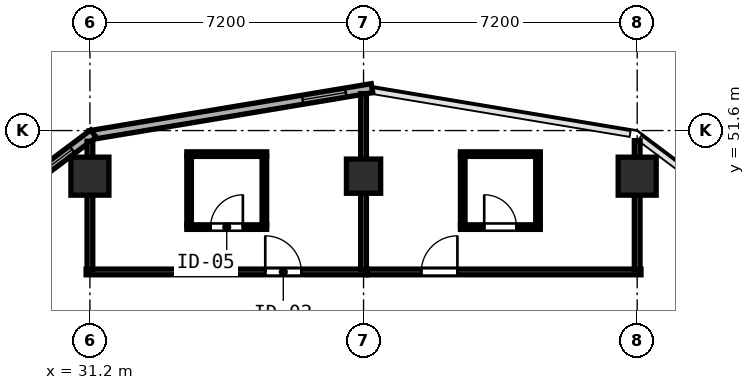
"""IFC4 building model, lengths in metres.
Left out: names, types, materials, properties, quantities, classifications, styles, units other than length and angle.
Written with IfcOpenShell. Run it as: python <this file> out.ifc"""

import sys

from ifc_helpers import new_model, si_unit, direction, frame, frame_2d, origin, origin_2d, place, context, subcontext, project, spatial, rectangle, hollow_rectangle, extrude, element, fill, save


model = new_model("IFC4")
c1 = context("Model", 3, precision=1e-05, world=origin(), true_north=direction((0.0, 1.0)))
c2 = subcontext(c1, "Body", "Model", "MODEL_VIEW")
j1 = project(units=[si_unit("LENGTHUNIT", "METRE"), si_unit("PLANEANGLEUNIT", "RADIAN")], contexts=[c1])
p1 = place(None, origin())
s1 = spatial("IfcSite", under=j1, at=p1, CompositionType="ELEMENT")
p2 = place(p1, origin())
s2 = spatial("IfcBuilding", under=s1, at=p2, CompositionType="ELEMENT")
p3 = place(p2, frame((0.0, 0.0, 98.4)))
s3 = spatial("IfcBuildingStorey", under=s2, at=p3, CompositionType="ELEMENT", Elevation=98.4)
for number, where, z_axis, x_axis in (
    (1, (31.2, 50.4, 0.0), (0.0, 0.0, 1.0), (1.0, 0.0, 0.0)),
    (2, (45.6, 50.4, 0.0), (0.0, 0.0, 1.0), (1.0, 0.0, 0.0)),
):
    element("IfcColumn", number, at=place(p3, frame(where, z_axis=z_axis, x_axis=x_axis)), inside=s3, PredefinedType="COLUMN", context=c2, shape_type="SweptSolid", body=[
        extrude(hollow_rectangle(XDim=1.0, YDim=1.0, WallThickness=0.038, at=origin_2d()), origin(), (0.0, 0.0, 1.0), 3.8),
    ])
p4 = place(p3, frame((38.4, 50.4, 0.0), z_axis=(0.0, 0.0, 1.0), x_axis=(1.0, 0.0, 0.0)))
e3 = element("IfcColumn", 3, at=p4, inside=s3, PredefinedType="COLUMN", context=c2, shape_type="SweptSolid", body=[
    extrude(hollow_rectangle(XDim=0.9, YDim=0.9, WallThickness=0.034, at=origin_2d()), origin(), (0.0, 0.0, 1.0), 3.8),
])
p5 = place(p3, frame((38.622, 52.715, 0.0), z_axis=(0.0, 0.0, 1.0), x_axis=(-0.98639129485, -0.164414760418, 0.0)))
e4 = element("IfcWall", 4, at=p5, inside=s3, PredefinedType="SOLIDWALL", context=c2, shape_type="SweptSolid", body=[
    extrude(rectangle(XDim=7.53, YDim=0.24, at=frame_2d((3.765, 0.0))), origin(), (0.0, 0.0, 1.0), 3.6),
])
p6 = place(p5, frame((0.7, 0.0, 0.85)))
e5 = element("IfcOpeningElement", 5, at=p6, cuts=e4, PredefinedType="OPENING", context=c2, shape_type="SweptSolid", body=[
    extrude(rectangle(XDim=1.15, YDim=1.8, at=frame_2d((0.575, 0.9))), frame((0.0, 0.13, 0.0), z_axis=(0.0, -1.0, 0.0), x_axis=(1.0, 0.0, 0.0)), (0.0, 0.0, 1.0), 0.26),
])
p7 = place(p3, frame((31.292, 51.519, 0.0), z_axis=(0.0, 0.0, 1.0), x_axis=(-0.8, -0.6, 0.0)))
e6 = element("IfcWall", 6, at=p7, inside=s3, PredefinedType="SOLIDWALL", context=c2, shape_type="SweptSolid", body=[
    extrude(rectangle(XDim=6.021, YDim=0.24, at=frame_2d((3.01, 0.0))), origin(), (0.0, 0.0, 1.0), 3.6),
])
p8 = place(p7, frame((0.7, 0.0, 0.85)))
e7 = element("IfcOpeningElement", 7, at=p8, cuts=e6, PredefinedType="OPENING", context=c2, shape_type="SweptSolid", body=[
    extrude(rectangle(XDim=1.15, YDim=1.8, at=frame_2d((0.575, 0.9))), frame((0.0, 0.13, 0.0), z_axis=(0.0, -1.0, 0.0), x_axis=(1.0, 0.0, 0.0)), (0.0, 0.0, 1.0), 0.26),
])
p9 = place(p3, frame((31.1, 47.88, 0.0), z_axis=(0.0, 0.0, 1.0), x_axis=(1.0, 0.0, 0.0)))
e8 = element("IfcWall", 8, at=p9, inside=s3, PredefinedType="PARTITIONING", context=c2, shape_type="SweptSolid", body=[
    extrude(rectangle(XDim=7.4, YDim=0.15, at=frame_2d((3.7, 0.0))), origin(), (0.0, 0.0, 1.0), 3.6),
])
p10 = place(p9, frame((4.714, 0.0, 0.0)))
e9 = element("IfcOpeningElement", 9, at=p10, cuts=e8, PredefinedType="OPENING", context=c2, shape_type="SweptSolid", body=[
    extrude(rectangle(XDim=0.95, YDim=2.15, at=frame_2d((0.475, 1.075))), frame((0.0, 0.085, 0.0), z_axis=(0.0, -1.0, 0.0), x_axis=(1.0, 0.0, 0.0)), (0.0, 0.0, 1.0), 0.17),
])
p11 = place(p3, frame((31.2, 47.94, 0.0), z_axis=(0.0, 0.0, 1.0), x_axis=(0.0, 1.0, 0.0)))
e10 = element("IfcWall", 10, at=p11, inside=s3, PredefinedType="PARTITIONING", context=c2, shape_type="SweptSolid", body=[
    extrude(rectangle(XDim=3.379, YDim=0.15, at=frame_2d((1.689, 0.0))), origin(), (0.0, 0.0, 1.0), 3.085),
])
p12 = place(p3, frame((38.4, 47.94, 0.0), z_axis=(0.0, 0.0, 1.0), x_axis=(0.0, 1.0, 0.0)))
e11 = element("IfcWall", 11, at=p12, inside=s3, PredefinedType="PARTITIONING", context=c2, shape_type="SweptSolid", body=[
    extrude(rectangle(XDim=4.632, YDim=0.15, at=frame_2d((2.316, 0.0))), origin(), (0.0, 0.0, 1.0), 3.6),
])
p13 = place(p3, frame((33.75, 50.98, 0.0), z_axis=(0.0, 0.0, 1.0), x_axis=(1.0, 0.0, 0.0)))
e12 = element("IfcWall", 12, at=p13, inside=s3, PredefinedType="PARTITIONING", context=c2, shape_type="SweptSolid", body=[
    extrude(rectangle(XDim=2.1, YDim=0.12, at=frame_2d((1.05, 0.0))), origin(), (0.0, 0.0, 1.0), 3.6),
])
p14 = place(p3, frame((33.75, 49.06, 0.0), z_axis=(0.0, 0.0, 1.0), x_axis=(1.0, 0.0, 0.0)))
e13 = element("IfcWall", 13, at=p14, inside=s3, PredefinedType="PARTITIONING", context=c2, shape_type="SweptSolid", body=[
    extrude(rectangle(XDim=2.1, YDim=0.12, at=frame_2d((1.05, 0.0))), origin(), (0.0, 0.0, 1.0), 3.6),
])
p15 = place(p14, frame((0.625, 0.0, 0.0)))
e14 = element("IfcOpeningElement", 14, at=p15, cuts=e13, PredefinedType="OPENING", context=c2, shape_type="SweptSolid", body=[
    extrude(rectangle(XDim=0.85, YDim=2.1, at=frame_2d((0.425, 1.05))), frame((0.0, 0.07, 0.0), z_axis=(0.0, -1.0, 0.0), x_axis=(1.0, 0.0, 0.0)), (0.0, 0.0, 1.0), 0.14),
])
for number, where, z_axis, x_axis in (
    (15, (33.81, 49.105, 0.0), (0.0, 0.0, 1.0), (0.0, 1.0, 0.0)),
    (16, (35.79, 49.105, 0.0), (0.0, 0.0, 1.0), (0.0, 1.0, 0.0)),
):
    element("IfcWall", number, at=place(p3, frame(where, z_axis=z_axis, x_axis=x_axis)), inside=s3, PredefinedType="PARTITIONING", context=c2, shape_type="SweptSolid", body=[
        extrude(rectangle(XDim=1.83, YDim=0.12, at=frame_2d((0.915, 0.0))), origin(), (0.0, 0.0, 1.0), 3.6),
    ])
p16 = place(p3, frame((38.502, 47.88, 0.0), z_axis=(0.0, 0.0, 1.0), x_axis=(1.0, 0.0, 0.0)))
e17 = element("IfcWall", 17, at=p16, inside=s3, PredefinedType="PARTITIONING", context=c2, shape_type="SweptSolid", body=[
    extrude(rectangle(XDim=7.198, YDim=0.15, at=frame_2d((3.599, 0.0))), origin(), (0.0, 0.0, 1.0), 3.6),
])
p17 = place(p16, frame((1.417, 0.0, 0.0)))
e18 = element("IfcOpeningElement", 18, at=p17, cuts=e17, PredefinedType="OPENING", context=c2, shape_type="SweptSolid", body=[
    extrude(rectangle(XDim=0.95, YDim=2.15, at=frame_2d((0.475, 1.075))), frame((0.0, 0.085, 0.0), z_axis=(0.0, -1.0, 0.0), x_axis=(1.0, 0.0, 0.0)), (0.0, 0.0, 1.0), 0.17),
])
p18 = place(p3, frame((45.6, 47.94, 0.0), z_axis=(0.0, 0.0, 1.0), x_axis=(0.0, 1.0, 0.0)))
e19 = element("IfcWall", 19, at=p18, inside=s3, PredefinedType="PARTITIONING", context=c2, shape_type="SweptSolid", body=[
    extrude(rectangle(XDim=3.395, YDim=0.15, at=frame_2d((1.698, 0.0))), origin(), (0.0, 0.0, 1.0), 3.085),
])
p19 = place(p3, frame((40.95, 50.98, 0.0), z_axis=(0.0, 0.0, 1.0), x_axis=(1.0, 0.0, 0.0)))
e20 = element("IfcWall", 20, at=p19, inside=s3, PredefinedType="PARTITIONING", context=c2, shape_type="SweptSolid", body=[
    extrude(rectangle(XDim=2.1, YDim=0.12, at=frame_2d((1.05, 0.0))), origin(), (0.0, 0.0, 1.0), 3.6),
])
p20 = place(p3, frame((40.95, 49.06, 0.0), z_axis=(0.0, 0.0, 1.0), x_axis=(1.0, 0.0, 0.0)))
e21 = element("IfcWall", 21, at=p20, inside=s3, PredefinedType="PARTITIONING", context=c2, shape_type="SweptSolid", body=[
    extrude(rectangle(XDim=2.1, YDim=0.12, at=frame_2d((1.05, 0.0))), origin(), (0.0, 0.0, 1.0), 3.6),
])
p21 = place(p20, frame((0.625, 0.0, 0.0)))
e22 = element("IfcOpeningElement", 22, at=p21, cuts=e21, PredefinedType="OPENING", context=c2, shape_type="SweptSolid", body=[
    extrude(rectangle(XDim=0.85, YDim=2.1, at=frame_2d((0.425, 1.05))), frame((0.0, 0.07, 0.0), z_axis=(0.0, -1.0, 0.0), x_axis=(1.0, 0.0, 0.0)), (0.0, 0.0, 1.0), 0.14),
])
for number, where, z_axis, x_axis in (
    (23, (41.01, 49.105, 0.0), (0.0, 0.0, 1.0), (0.0, 1.0, 0.0)),
    (24, (42.99, 49.105, 0.0), (0.0, 0.0, 1.0), (0.0, 1.0, 0.0)),
):
    element("IfcWall", number, at=place(p3, frame(where, z_axis=z_axis, x_axis=x_axis)), inside=s3, PredefinedType="PARTITIONING", context=c2, shape_type="SweptSolid", body=[
        extrude(rectangle(XDim=1.83, YDim=0.12, at=frame_2d((0.915, 0.0))), origin(), (0.0, 0.0, 1.0), 3.6),
    ])
p22 = place(p6, origin())
e25 = element("IfcWindow", 25, at=p22, inside=s3, PartitioningType="SINGLE_PANEL", PredefinedType="WINDOW", context=c2, shape_type="SweptSolid", body=[
    extrude(rectangle(XDim=1.15, YDim=1.8, at=frame_2d((0.575, 0.9))), frame((0.0, 0.03, 0.0), z_axis=(0.0, -1.0, 0.0), x_axis=(1.0, 0.0, 0.0)), (0.0, 0.0, 1.0), 0.06),
])
fill(e5, e25)
p23 = place(p8, origin())
e26 = element("IfcWindow", 26, at=p23, inside=s3, PartitioningType="SINGLE_PANEL", PredefinedType="WINDOW", context=c2, shape_type="SweptSolid", body=[
    extrude(rectangle(XDim=1.15, YDim=1.8, at=frame_2d((0.575, 0.9))), frame((0.0, 0.03, 0.0), z_axis=(0.0, -1.0, 0.0), x_axis=(1.0, 0.0, 0.0)), (0.0, 0.0, 1.0), 0.06),
])
fill(e7, e26)
p24 = place(p10, origin())
e27 = element("IfcDoor", 27, at=p24, inside=s3, OperationType="SINGLE_SWING_LEFT", PredefinedType="DOOR", context=c2, shape_type="SweptSolid", body=[
    extrude(rectangle(XDim=0.95, YDim=2.15, at=frame_2d((0.475, 1.075))), frame((0.0, 0.025, 0.0), z_axis=(0.0, -1.0, 0.0), x_axis=(1.0, 0.0, 0.0)), (0.0, 0.0, 1.0), 0.05),
])
fill(e9, e27)
p25 = place(p15, origin())
e28 = element("IfcDoor", 28, at=p25, inside=s3, OperationType="SINGLE_SWING_RIGHT", PredefinedType="DOOR", context=c2, shape_type="SweptSolid", body=[
    extrude(rectangle(XDim=0.85, YDim=2.1, at=frame_2d((0.425, 1.05))), frame((0.0, 0.025, 0.0), z_axis=(0.0, -1.0, 0.0), x_axis=(1.0, 0.0, 0.0)), (0.0, 0.0, 1.0), 0.05),
])
fill(e14, e28)
p26 = place(p17, origin())
e29 = element("IfcDoor", 29, at=p26, inside=s3, OperationType="SINGLE_SWING_RIGHT", PredefinedType="DOOR", context=c2, shape_type="SweptSolid", body=[
    extrude(rectangle(XDim=0.95, YDim=2.15, at=frame_2d((0.475, 1.075))), frame((0.0, 0.025, 0.0), z_axis=(0.0, -1.0, 0.0), x_axis=(1.0, 0.0, 0.0)), (0.0, 0.0, 1.0), 0.05),
])
fill(e18, e29)
p27 = place(p21, origin())
e30 = element("IfcDoor", 30, at=p27, inside=s3, OperationType="SINGLE_SWING_LEFT", PredefinedType="DOOR", context=c2, shape_type="SweptSolid", body=[
    extrude(rectangle(XDim=0.85, YDim=2.1, at=frame_2d((0.425, 1.05))), frame((0.0, 0.025, 0.0), z_axis=(0.0, -1.0, 0.0), x_axis=(1.0, 0.0, 0.0)), (0.0, 0.0, 1.0), 0.05),
])
fill(e22, e30)
save(model, sys.argv[1])
